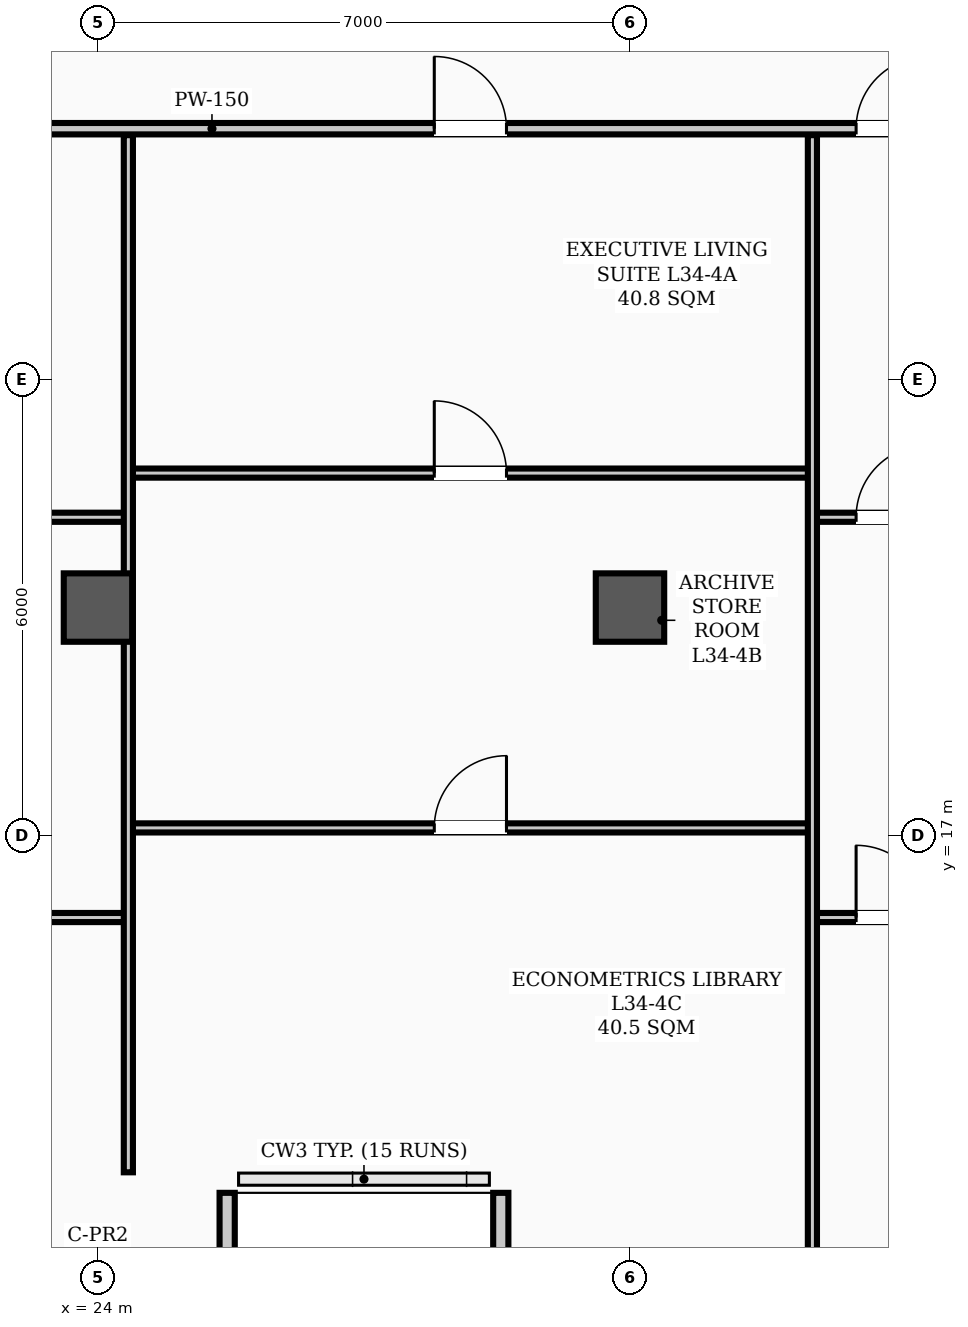
"""IFC4 building model, lengths in metres.
Left out: names, types, materials, properties, quantities, classifications, styles, units other than length and angle.
Written with IfcOpenShell. Run it as: python <this file> out.ifc"""

import sys

from ifc_helpers import new_model, si_unit, direction, frame, frame_2d, origin, origin_2d, place, context, subcontext, project, spatial, rectangle, hollow_rectangle, extrude, element, fill, save


model = new_model("IFC4")
c1 = context("Model", 3, precision=1e-05, world=origin(), true_north=direction((0.0, 1.0)))
c2 = subcontext(c1, "Body", "Model", "MODEL_VIEW")
j1 = project(units=[si_unit("LENGTHUNIT", "METRE"), si_unit("PLANEANGLEUNIT", "RADIAN")], contexts=[c1])
p1 = place(None, origin())
s1 = spatial("IfcSite", under=j1, at=p1, CompositionType="ELEMENT")
p2 = place(p1, origin())
s2 = spatial("IfcBuilding", under=s1, at=p2, CompositionType="ELEMENT")
p3 = place(p2, frame((0.0, 0.0, 138.3)))
s3 = spatial("IfcBuildingStorey", under=s2, at=p3, CompositionType="ELEMENT", Elevation=138.3)
for number, where, z_axis, x_axis in (
    (1, (24.0, 20.0, 0.0), (0.0, 0.0, 1.0), (1.0, 0.0, 0.0)),
    (2, (31.0, 20.0, 0.0), (0.0, 0.0, 1.0), (1.0, 0.0, 0.0)),
):
    element("IfcColumn", number, at=place(p3, frame(where, z_axis=z_axis, x_axis=x_axis)), inside=s3, PredefinedType="COLUMN", context=c2, shape_type="SweptSolid", body=[
        extrude(hollow_rectangle(XDim=0.9, YDim=0.9, WallThickness=0.035, InnerFilletRadius=0.017, OuterFilletRadius=0.052, at=origin_2d()), origin(), (0.0, 0.0, 1.0), 3.9),
    ])
for number, where, z_axis, x_axis in (
    (3, (25.7, 10.6, 0.0), (0.0, 0.0, 1.0), (0.0, 1.0, 0.0)),
    (4, (29.3, 12.3, 0.0), (0.0, 0.0, 1.0), (0.0, -1.0, 0.0)),
):
    element("IfcWall", number, at=place(p3, frame(where, z_axis=z_axis, x_axis=x_axis)), inside=s3, PredefinedType="PARAPET", context=c2, shape_type="SweptSolid", body=[
        extrude(rectangle(XDim=1.7, YDim=0.2, at=frame_2d((0.85, 0.0))), origin(), (0.0, 0.0, 1.0), 1.2),
    ])
p4 = place(p3, frame((2.31, 26.3, 0.0), z_axis=(0.0, 0.0, 1.0), x_axis=(1.0, 0.0, 0.0)))
e5 = element("IfcWall", 5, at=p4, inside=s3, PredefinedType="PARTITIONING", context=c2, shape_type="SweptSolid", body=[
    extrude(rectangle(XDim=46.38, YDim=0.15, at=frame_2d((23.19, 0.0))), origin(), (0.0, 0.0, 1.0), 2.24),
])
p5 = place(p4, frame((12.515, 0.0, 0.0)))
e6 = element("IfcOpeningElement", 6, at=p5, cuts=e5, PredefinedType="OPENING", context=c2, shape_type="SweptSolid", body=[
    extrude(rectangle(XDim=0.95, YDim=2.08, at=frame_2d((0.475, 1.04))), frame((0.0, 0.085, 0.0), z_axis=(0.0, -1.0, 0.0), x_axis=(1.0, 0.0, 0.0)), (0.0, 0.0, 1.0), 0.17),
])
p6 = place(p4, frame((18.615, 0.0, 0.0)))
e7 = element("IfcOpeningElement", 7, at=p6, cuts=e5, PredefinedType="OPENING", context=c2, shape_type="SweptSolid", body=[
    extrude(rectangle(XDim=0.95, YDim=2.08, at=frame_2d((0.475, 1.04))), frame((0.0, 0.085, 0.0), z_axis=(0.0, -1.0, 0.0), x_axis=(1.0, 0.0, 0.0)), (0.0, 0.0, 1.0), 0.17),
])
p7 = place(p4, frame((26.115, 0.0, 0.0)))
e8 = element("IfcOpeningElement", 8, at=p7, cuts=e5, PredefinedType="OPENING", context=c2, shape_type="SweptSolid", body=[
    extrude(rectangle(XDim=0.95, YDim=2.08, at=frame_2d((0.475, 1.04))), frame((0.0, 0.085, 0.0), z_axis=(0.0, -1.0, 0.0), x_axis=(1.0, 0.0, 0.0)), (0.0, 0.0, 1.0), 0.17),
])
p8 = place(p4, frame((31.665, 0.0, 0.0)))
e9 = element("IfcOpeningElement", 9, at=p8, cuts=e5, PredefinedType="OPENING", context=c2, shape_type="SweptSolid", body=[
    extrude(rectangle(XDim=0.95, YDim=2.08, at=frame_2d((0.475, 1.04))), frame((0.0, 0.085, 0.0), z_axis=(0.0, -1.0, 0.0), x_axis=(1.0, 0.0, 0.0)), (0.0, 0.0, 1.0), 0.17),
])
p9 = place(p4, frame((43.06, 0.0, 0.0)))
e10 = element("IfcOpeningElement", 10, at=p9, cuts=e5, PredefinedType="OPENING", context=c2, shape_type="SweptSolid", body=[
    extrude(rectangle(XDim=0.95, YDim=2.08, at=frame_2d((0.475, 1.04))), frame((0.0, 0.085, 0.0), z_axis=(0.0, -1.0, 0.0), x_axis=(1.0, 0.0, 0.0)), (0.0, 0.0, 1.0), 0.17),
])
p10 = place(p3, frame((18.4, 21.188, 0.0), z_axis=(0.0, 0.0, 1.0), x_axis=(1.0, 0.0, 0.0)))
e11 = element("IfcWall", 11, at=p10, inside=s3, PredefinedType="PARTITIONING", context=c2, shape_type="SweptSolid", body=[
    extrude(rectangle(XDim=6.0, YDim=0.12, at=frame_2d((3.0, 0.0))), origin(), (0.0, 0.0, 1.0), 2.24),
])
p11 = place(p10, frame((2.525, 0.0, 0.0)))
e12 = element("IfcOpeningElement", 12, at=p11, cuts=e11, PredefinedType="OPENING", context=c2, shape_type="SweptSolid", body=[
    extrude(rectangle(XDim=0.95, YDim=2.08, at=frame_2d((0.475, 1.04))), frame((0.0, 0.07, 0.0), z_axis=(0.0, -1.0, 0.0), x_axis=(1.0, 0.0, 0.0)), (0.0, 0.0, 1.0), 0.14),
])
p12 = place(p3, frame((18.4, 15.922, 0.0), z_axis=(0.0, 0.0, 1.0), x_axis=(1.0, 0.0, 0.0)))
e13 = element("IfcWall", 13, at=p12, inside=s3, PredefinedType="PARTITIONING", context=c2, shape_type="SweptSolid", body=[
    extrude(rectangle(XDim=6.0, YDim=0.12, at=frame_2d((3.0, 0.0))), origin(), (0.0, 0.0, 1.0), 2.24),
])
p13 = place(p12, frame((2.525, 0.0, 0.0)))
e14 = element("IfcOpeningElement", 14, at=p13, cuts=e13, PredefinedType="OPENING", context=c2, shape_type="SweptSolid", body=[
    extrude(rectangle(XDim=0.95, YDim=2.08, at=frame_2d((0.475, 1.04))), frame((0.0, 0.07, 0.0), z_axis=(0.0, -1.0, 0.0), x_axis=(1.0, 0.0, 0.0)), (0.0, 0.0, 1.0), 0.14),
])
p14 = place(p3, frame((24.4, 21.769, 0.0), z_axis=(0.0, 0.0, 1.0), x_axis=(1.0, 0.0, 0.0)))
e15 = element("IfcWall", 15, at=p14, inside=s3, PredefinedType="PARTITIONING", context=c2, shape_type="SweptSolid", body=[
    extrude(rectangle(XDim=9.0, YDim=0.12, at=frame_2d((4.5, 0.0))), origin(), (0.0, 0.0, 1.0), 2.24),
])
p15 = place(p14, frame((4.025, 0.0, 0.0)))
e16 = element("IfcOpeningElement", 16, at=p15, cuts=e15, PredefinedType="OPENING", context=c2, shape_type="SweptSolid", body=[
    extrude(rectangle(XDim=0.95, YDim=2.08, at=frame_2d((0.475, 1.04))), frame((0.0, 0.07, 0.0), z_axis=(0.0, -1.0, 0.0), x_axis=(1.0, 0.0, 0.0)), (0.0, 0.0, 1.0), 0.14),
])
p16 = place(p3, frame((24.4, 17.101, 0.0), z_axis=(0.0, 0.0, 1.0), x_axis=(1.0, 0.0, 0.0)))
e17 = element("IfcWall", 17, at=p16, inside=s3, PredefinedType="PARTITIONING", context=c2, shape_type="SweptSolid", body=[
    extrude(rectangle(XDim=9.0, YDim=0.12, at=frame_2d((4.5, 0.0))), origin(), (0.0, 0.0, 1.0), 2.24),
])
p17 = place(p16, frame((4.025, 0.0, 0.0)))
e18 = element("IfcOpeningElement", 18, at=p17, cuts=e17, PredefinedType="OPENING", context=c2, shape_type="SweptSolid", body=[
    extrude(rectangle(XDim=0.95, YDim=2.08, at=frame_2d((0.475, 1.04))), frame((0.0, 0.07, 0.0), z_axis=(0.0, -1.0, 0.0), x_axis=(1.0, 0.0, 0.0)), (0.0, 0.0, 1.0), 0.14),
])
p18 = place(p3, frame((33.4, 21.188, 0.0), z_axis=(0.0, 0.0, 1.0), x_axis=(1.0, 0.0, 0.0)))
e19 = element("IfcWall", 19, at=p18, inside=s3, PredefinedType="PARTITIONING", context=c2, shape_type="SweptSolid", body=[
    extrude(rectangle(XDim=7.8, YDim=0.12, at=frame_2d((3.9, 0.0))), origin(), (0.0, 0.0, 1.0), 2.24),
])
p19 = place(p18, frame((0.575, 0.0, 0.0)))
e20 = element("IfcOpeningElement", 20, at=p19, cuts=e19, PredefinedType="OPENING", context=c2, shape_type="SweptSolid", body=[
    extrude(rectangle(XDim=0.95, YDim=2.08, at=frame_2d((0.475, 1.04))), frame((0.0, 0.07, 0.0), z_axis=(0.0, -1.0, 0.0), x_axis=(1.0, 0.0, 0.0)), (0.0, 0.0, 1.0), 0.14),
])
p20 = place(p3, frame((33.4, 15.922, 0.0), z_axis=(0.0, 0.0, 1.0), x_axis=(1.0, 0.0, 0.0)))
e21 = element("IfcWall", 21, at=p20, inside=s3, PredefinedType="PARTITIONING", context=c2, shape_type="SweptSolid", body=[
    extrude(rectangle(XDim=7.8, YDim=0.12, at=frame_2d((3.9, 0.0))), origin(), (0.0, 0.0, 1.0), 2.24),
])
p21 = place(p20, frame((0.575, 0.0, 0.0)))
e22 = element("IfcOpeningElement", 22, at=p21, cuts=e21, PredefinedType="OPENING", context=c2, shape_type="SweptSolid", body=[
    extrude(rectangle(XDim=0.95, YDim=2.08, at=frame_2d((0.475, 1.04))), frame((0.0, 0.07, 0.0), z_axis=(0.0, -1.0, 0.0), x_axis=(1.0, 0.0, 0.0)), (0.0, 0.0, 1.0), 0.14),
])
p22 = place(p3, frame((24.4, 12.57, 0.0), z_axis=(0.0, 0.0, 1.0), x_axis=(0.0, 1.0, 0.0)))
e23 = element("IfcWall", 23, at=p22, inside=s3, PredefinedType="PARTITIONING", context=c2, shape_type="SweptSolid", body=[
    extrude(rectangle(XDim=13.645, YDim=0.12, at=frame_2d((6.823, 0.0))), origin(), (0.0, 0.0, 1.0), 2.24),
])
p23 = place(p3, frame((33.4, 10.81, 0.0), z_axis=(0.0, 0.0, 1.0), x_axis=(0.0, 1.0, 0.0)))
e24 = element("IfcWall", 24, at=p23, inside=s3, PredefinedType="PARTITIONING", context=c2, shape_type="SweptSolid", body=[
    extrude(rectangle(XDim=15.405, YDim=0.12, at=frame_2d((7.703, 0.0))), origin(), (0.0, 0.0, 1.0), 2.24),
])
p24 = place(p15, origin())
e25 = element("IfcDoor", 25, at=p24, inside=s3, OperationType="SINGLE_SWING_LEFT", PredefinedType="DOOR", context=c2, shape_type="SweptSolid", body=[
    extrude(rectangle(XDim=0.95, YDim=2.08, at=frame_2d((0.475, 1.04))), frame((0.0, 0.025, 0.0), z_axis=(0.0, -1.0, 0.0), x_axis=(1.0, 0.0, 0.0)), (0.0, 0.0, 1.0), 0.05),
])
fill(e16, e25)
p25 = place(p17, origin())
e26 = element("IfcDoor", 26, at=p25, inside=s3, OperationType="SINGLE_SWING_RIGHT", PredefinedType="DOOR", context=c2, shape_type="SweptSolid", body=[
    extrude(rectangle(XDim=0.95, YDim=2.08, at=frame_2d((0.475, 1.04))), frame((0.0, 0.025, 0.0), z_axis=(0.0, -1.0, 0.0), x_axis=(1.0, 0.0, 0.0)), (0.0, 0.0, 1.0), 0.05),
])
fill(e18, e26)
p26 = place(p7, origin())
e27 = element("IfcDoor", 27, at=p26, inside=s3, OperationType="SINGLE_SWING_LEFT", PredefinedType="DOOR", context=c2, shape_type="SweptSolid", body=[
    extrude(rectangle(XDim=0.95, YDim=2.08, at=frame_2d((0.475, 1.04))), frame((0.0, 0.025, 0.0), z_axis=(0.0, -1.0, 0.0), x_axis=(1.0, 0.0, 0.0)), (0.0, 0.0, 1.0), 0.05),
])
fill(e8, e27)
p27 = place(p19, origin())
e28 = element("IfcDoor", 28, at=p27, inside=s3, OperationType="SINGLE_SWING_RIGHT", PredefinedType="DOOR", context=c2, shape_type="SweptSolid", body=[
    extrude(rectangle(XDim=0.95, YDim=2.08, at=frame_2d((0.475, 1.04))), frame((0.0, 0.025, 0.0), z_axis=(0.0, -1.0, 0.0), x_axis=(1.0, 0.0, 0.0)), (0.0, 0.0, 1.0), 0.05),
])
fill(e20, e28)
p28 = place(p21, origin())
e29 = element("IfcDoor", 29, at=p28, inside=s3, OperationType="SINGLE_SWING_LEFT", PredefinedType="DOOR", context=c2, shape_type="SweptSolid", body=[
    extrude(rectangle(XDim=0.95, YDim=2.08, at=frame_2d((0.475, 1.04))), frame((0.0, 0.025, 0.0), z_axis=(0.0, -1.0, 0.0), x_axis=(1.0, 0.0, 0.0)), (0.0, 0.0, 1.0), 0.05),
])
fill(e22, e29)
p29 = place(p8, origin())
e30 = element("IfcDoor", 30, at=p29, inside=s3, OperationType="SINGLE_SWING_RIGHT", PredefinedType="DOOR", context=c2, shape_type="SweptSolid", body=[
    extrude(rectangle(XDim=0.95, YDim=2.08, at=frame_2d((0.475, 1.04))), frame((0.0, 0.025, 0.0), z_axis=(0.0, -1.0, 0.0), x_axis=(1.0, 0.0, 0.0)), (0.0, 0.0, 1.0), 0.05),
])
fill(e9, e30)
save(model, sys.argv[1])
